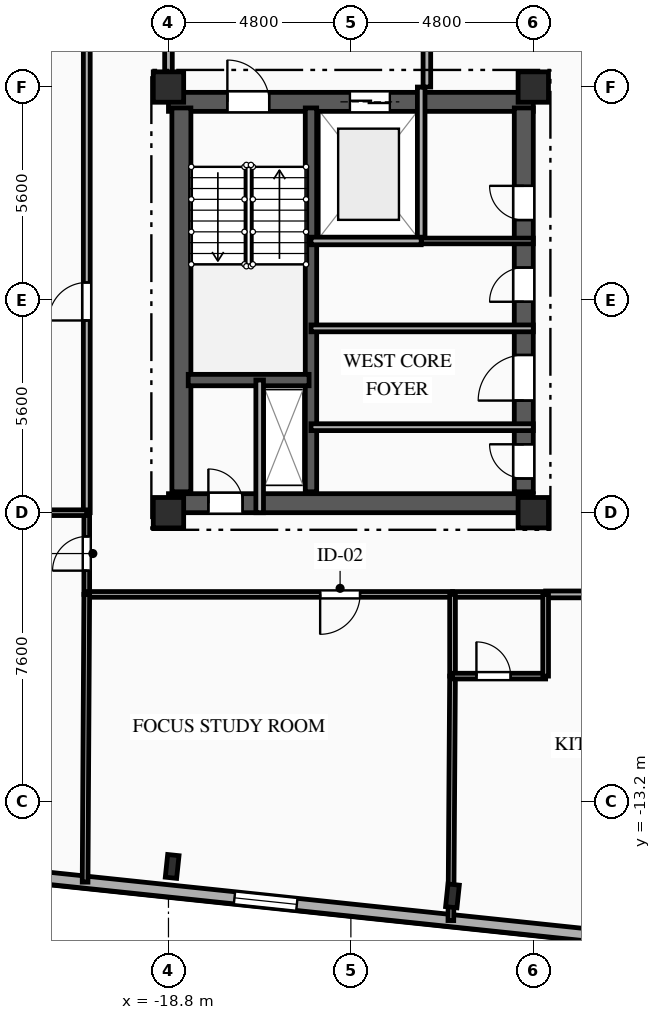
"""IFC4 building model, lengths in metres.
Left out: names, types, materials, properties, quantities, classifications, styles, units other than length and angle.
Written with IfcOpenShell. Run it as: python <this file> out.ifc"""

import sys

from ifc_helpers import new_model, si_unit, direction, frame, frame_2d, origin, origin_2d, place, context, subcontext, project, spatial, rectangle, i_section, extrude, element, fill, save


model = new_model("IFC4")
c1 = context("Model", 3, precision=1e-05, world=origin(), true_north=direction((0.0, 1.0)))
c2 = subcontext(c1, "Body", "Model", "MODEL_VIEW")
j1 = project(units=[si_unit("LENGTHUNIT", "METRE"), si_unit("PLANEANGLEUNIT", "RADIAN")], contexts=[c1])
p1 = place(None, origin())
s1 = spatial("IfcSite", under=j1, at=p1, CompositionType="ELEMENT")
p2 = place(p1, origin())
s2 = spatial("IfcBuilding", under=s1, at=p2, CompositionType="ELEMENT")
p3 = place(p2, frame((0.0, 0.0, 183.0)))
s3 = spatial("IfcBuildingStorey", under=s2, at=p3, CompositionType="ELEMENT", Elevation=183.0)
for number, where, z_axis, x_axis in (
    (1, (-18.8, -5.6, 0.0), (0.0, 0.0, 1.0), (1.0, 0.0, 0.0)),
    (2, (-18.8, 5.6, 0.0), (0.0, 0.0, 1.0), (1.0, 0.0, 0.0)),
    (3, (-9.2, -5.6, 0.0), (0.0, 0.0, 1.0), (1.0, 0.0, 0.0)),
    (4, (-9.2, 5.6, 0.0), (0.0, 0.0, 1.0), (1.0, 0.0, 0.0)),
):
    element("IfcColumn", number, at=place(p3, frame(where, z_axis=z_axis, x_axis=x_axis)), inside=s3, PredefinedType="COLUMN", context=c2, shape_type="SweptSolid", body=[
        extrude(rectangle(XDim=0.8, YDim=0.8, at=origin_2d()), origin(), (0.0, 0.0, 1.0), 3.35),
    ])
for number, where, z_axis, x_axis in (
    (5, (-18.703, -14.908, 0.0), (0.0, 0.0, 1.0), (0.995, -0.105, 0.0)),
    (6, (-11.327, -15.683, 0.0), (0.0, 0.0, 1.0), (0.995, -0.105, 0.0)),
):
    element("IfcColumn", number, at=place(p3, frame(where, z_axis=z_axis, x_axis=x_axis)), inside=s3, PredefinedType="COLUMN", context=c2, shape_type="SweptSolid", body=[
        extrude(i_section(OverallWidth=0.3, OverallDepth=0.6, WebThickness=0.015, FlangeThickness=0.03, FilletRadius=0.027, at=origin_2d()), origin(), (0.0, 0.0, 1.0), 3.35),
    ])
p4 = place(p3, frame((18.756, -19.498, 0.0), z_axis=(0.0, 0.0, 1.0), x_axis=(-0.994522060044, 0.104526896475, 0.0)))
e7 = element("IfcWall", 7, at=p4, inside=s3, PredefinedType="SOLIDWALL", context=c2, shape_type="SweptSolid", body=[
    extrude(rectangle(XDim=45.8, YDim=0.32, at=frame_2d((22.9, 0.0))), origin(), (0.0, 0.0, 1.0), 3.04),
])
p5 = place(p4, frame((1.217, 0.0, 0.85)))
e8 = element("IfcOpeningElement", 8, at=p5, cuts=e7, PredefinedType="OPENING", context=c2, shape_type="SweptSolid", body=[
    extrude(rectangle(XDim=1.65, YDim=1.85, at=frame_2d((0.825, 0.925))), frame((0.0, 0.17, 0.0), z_axis=(0.0, -1.0, 0.0), x_axis=(1.0, 0.0, 0.0)), (0.0, 0.0, 1.0), 0.34),
])
p6 = place(p4, frame((5.621, 0.0, 0.85)))
e9 = element("IfcOpeningElement", 9, at=p6, cuts=e7, PredefinedType="OPENING", context=c2, shape_type="SweptSolid", body=[
    extrude(rectangle(XDim=1.65, YDim=1.85, at=frame_2d((0.825, 0.925))), frame((0.0, 0.17, 0.0), z_axis=(0.0, -1.0, 0.0), x_axis=(1.0, 0.0, 0.0)), (0.0, 0.0, 1.0), 0.34),
])
p7 = place(p4, frame((13.433, 0.0, 0.85)))
e10 = element("IfcOpeningElement", 10, at=p7, cuts=e7, PredefinedType="OPENING", context=c2, shape_type="SweptSolid", body=[
    extrude(rectangle(XDim=2.2, YDim=1.85, at=frame_2d((1.1, 0.925))), frame((0.0, 0.17, 0.0), z_axis=(0.0, -1.0, 0.0), x_axis=(1.0, 0.0, 0.0)), (0.0, 0.0, 1.0), 0.34),
])
p8 = place(p4, frame((23.962, 0.0, 0.85)))
e11 = element("IfcOpeningElement", 11, at=p8, cuts=e7, PredefinedType="OPENING", context=c2, shape_type="SweptSolid", body=[
    extrude(rectangle(XDim=2.2, YDim=1.85, at=frame_2d((1.1, 0.925))), frame((0.0, 0.17, 0.0), z_axis=(0.0, -1.0, 0.0), x_axis=(1.0, 0.0, 0.0)), (0.0, 0.0, 1.0), 0.34),
])
p9 = place(p4, frame((34.366, 0.0, 0.85)))
e12 = element("IfcOpeningElement", 12, at=p9, cuts=e7, PredefinedType="OPENING", context=c2, shape_type="SweptSolid", body=[
    extrude(rectangle(XDim=1.65, YDim=1.85, at=frame_2d((0.825, 0.925))), frame((0.0, 0.17, 0.0), z_axis=(0.0, -1.0, 0.0), x_axis=(1.0, 0.0, 0.0)), (0.0, 0.0, 1.0), 0.34),
])
p10 = place(p4, frame((41.892, 0.0, 0.85)))
e13 = element("IfcOpeningElement", 13, at=p10, cuts=e7, PredefinedType="OPENING", context=c2, shape_type="SweptSolid", body=[
    extrude(rectangle(XDim=1.65, YDim=1.85, at=frame_2d((0.825, 0.925))), frame((0.0, 0.17, 0.0), z_axis=(0.0, -1.0, 0.0), x_axis=(1.0, 0.0, 0.0)), (0.0, 0.0, 1.0), 0.34),
])
p11 = place(p3, frame((-18.8, 5.21, 0.0), z_axis=(0.0, 0.0, 1.0), x_axis=(1.0, 0.0, 0.0)))
e14 = element("IfcWall", 14, at=p11, inside=s3, PredefinedType="SHEAR", context=c2, shape_type="SweptSolid", body=[
    extrude(rectangle(XDim=9.6, YDim=0.5, at=frame_2d((4.8, 0.0))), origin(), (0.0, 0.0, 1.0), 3.04),
])
p12 = place(p11, frame((1.55, 0.0, 0.0)))
e15 = element("IfcOpeningElement", 15, at=p12, cuts=e14, PredefinedType="OPENING", context=c2, shape_type="SweptSolid", body=[
    extrude(rectangle(XDim=1.1, YDim=2.15, at=frame_2d((0.55, 1.075))), frame((0.0, 0.26, 0.0), z_axis=(0.0, -1.0, 0.0), x_axis=(1.0, 0.0, 0.0)), (0.0, 0.0, 1.0), 0.52),
])
p13 = place(p11, frame((4.775, 0.0, 0.0)))
e16 = element("IfcOpeningElement", 16, at=p13, cuts=e14, PredefinedType="OPENING", context=c2, shape_type="SweptSolid", body=[
    extrude(rectangle(XDim=1.05, YDim=2.1, at=frame_2d((0.525, 1.05))), frame((0.0, 0.26, 0.0), z_axis=(0.0, -1.0, 0.0), x_axis=(1.0, 0.0, 0.0)), (0.0, 0.0, 1.0), 0.52),
])
p14 = place(p3, frame((-18.8, -5.35, 0.0), z_axis=(0.0, 0.0, 1.0), x_axis=(1.0, 0.0, 0.0)))
e17 = element("IfcWall", 17, at=p14, inside=s3, PredefinedType="SHEAR", context=c2, shape_type="SweptSolid", body=[
    extrude(rectangle(XDim=9.6, YDim=0.5, at=frame_2d((4.8, 0.0))), origin(), (0.0, 0.0, 1.0), 3.04),
])
p15 = place(p14, frame((1.05, 0.0, 0.0)))
e18 = element("IfcOpeningElement", 18, at=p15, cuts=e17, PredefinedType="OPENING", context=c2, shape_type="SweptSolid", body=[
    extrude(rectangle(XDim=0.9, YDim=2.1, at=frame_2d((0.45, 1.05))), frame((0.0, 0.26, 0.0), z_axis=(0.0, -1.0, 0.0), x_axis=(1.0, 0.0, 0.0)), (0.0, 0.0, 1.0), 0.52),
])
p16 = place(p3, frame((-18.46, -5.05, 0.0), z_axis=(0.0, 0.0, 1.0), x_axis=(0.0, 1.0, 0.0)))
e19 = element("IfcWall", 19, at=p16, inside=s3, PredefinedType="SHEAR", context=c2, shape_type="SweptSolid", body=[
    extrude(rectangle(XDim=10.1, YDim=0.5, at=frame_2d((5.05, 0.0))), origin(), (0.0, 0.0, 1.0), 3.04),
])
p17 = place(p3, frame((-9.45, -5.05, 0.0), z_axis=(0.0, 0.0, 1.0), x_axis=(0.0, 1.0, 0.0)))
e20 = element("IfcWall", 20, at=p17, inside=s3, PredefinedType="SHEAR", context=c2, shape_type="SweptSolid", body=[
    extrude(rectangle(XDim=10.1, YDim=0.5, at=frame_2d((5.05, 0.0))), origin(), (0.0, 0.0, 1.0), 3.04),
])
p18 = place(p17, frame((7.15, 0.0, 0.0)))
e21 = element("IfcOpeningElement", 21, at=p18, cuts=e20, PredefinedType="OPENING", context=c2, shape_type="SweptSolid", body=[
    extrude(rectangle(XDim=0.9, YDim=2.1, at=frame_2d((0.45, 1.05))), frame((0.0, 0.26, 0.0), z_axis=(0.0, -1.0, 0.0), x_axis=(1.0, 0.0, 0.0)), (0.0, 0.0, 1.0), 0.52),
])
p19 = place(p17, frame((2.4, 0.0, 0.0)))
e22 = element("IfcOpeningElement", 22, at=p19, cuts=e20, PredefinedType="OPENING", context=c2, shape_type="SweptSolid", body=[
    extrude(rectangle(XDim=1.2, YDim=2.15, at=frame_2d((0.6, 1.075))), frame((0.0, 0.26, 0.0), z_axis=(0.0, -1.0, 0.0), x_axis=(1.0, 0.0, 0.0)), (0.0, 0.0, 1.0), 0.52),
])
p20 = place(p17, frame((0.35, 0.0, 0.0)))
e23 = element("IfcOpeningElement", 23, at=p20, cuts=e20, PredefinedType="OPENING", context=c2, shape_type="SweptSolid", body=[
    extrude(rectangle(XDim=0.9, YDim=2.1, at=frame_2d((0.45, 1.05))), frame((0.0, 0.26, 0.0), z_axis=(0.0, -1.0, 0.0), x_axis=(1.0, 0.0, 0.0)), (0.0, 0.0, 1.0), 0.52),
])
p21 = place(p17, frame((5.0, 0.0, 0.0)))
e24 = element("IfcOpeningElement", 24, at=p21, cuts=e20, PredefinedType="OPENING", context=c2, shape_type="SweptSolid", body=[
    extrude(rectangle(XDim=0.9, YDim=2.1, at=frame_2d((0.45, 1.05))), frame((0.0, 0.26, 0.0), z_axis=(0.0, -1.0, 0.0), x_axis=(1.0, 0.0, 0.0)), (0.0, 0.0, 1.0), 0.52),
])
p22 = place(p3, frame((-15.05, -5.05, 0.0), z_axis=(0.0, 0.0, 1.0), x_axis=(0.0, 1.0, 0.0)))
e25 = element("IfcWall", 25, at=p22, inside=s3, PredefinedType="SHEAR", context=c2, shape_type="SweptSolid", body=[
    extrude(rectangle(XDim=10.1, YDim=0.3, at=frame_2d((5.05, 0.0))), origin(), (0.0, 0.0, 1.0), 3.04),
])
p23 = place(p3, frame((-18.28, -2.11, 0.0), z_axis=(0.0, 0.0, 1.0), x_axis=(1.0, 0.0, 0.0)))
e26 = element("IfcWall", 26, at=p23, inside=s3, PredefinedType="SHEAR", context=c2, shape_type="SweptSolid", body=[
    extrude(rectangle(XDim=3.18, YDim=0.3, at=frame_2d((1.59, 0.0))), origin(), (0.0, 0.0, 1.0), 3.04),
])
p24 = place(p3, frame((-16.4, -5.6, 0.0), z_axis=(0.0, 0.0, 1.0), x_axis=(0.0, 1.0, 0.0)))
e27 = element("IfcWall", 27, at=p24, inside=s3, PredefinedType="PARTITIONING", context=c2, shape_type="SweptSolid", body=[
    extrude(rectangle(XDim=3.49, YDim=0.2, at=frame_2d((1.745, 0.0))), origin(), (0.0, 0.0, 1.0), 3.04),
])
p25 = place(p3, frame((-12.15, 1.55, 0.0), z_axis=(0.0, 0.0, 1.0), x_axis=(0.0, 1.0, 0.0)))
e28 = element("IfcWall", 28, at=p25, inside=s3, PredefinedType="PARTITIONING", context=c2, shape_type="SweptSolid", body=[
    extrude(rectangle(XDim=4.05, YDim=0.2, at=frame_2d((2.025, 0.0))), origin(), (0.0, 0.0, 1.0), 3.04),
])
p26 = place(p3, frame((-18.8, 8.5, 0.0), z_axis=(0.0, 0.0, 1.0), x_axis=(0.0, -1.0, 0.0)))
e29 = element("IfcWall", 29, at=p26, inside=s3, PredefinedType="PARTITIONING", context=c2, shape_type="SweptSolid", body=[
    extrude(rectangle(XDim=2.9, YDim=0.2, at=frame_2d((1.45, 0.0))), origin(), (0.0, 0.0, 1.0), 2.665),
])
p27 = place(p3, frame((-12.0, 5.6, 0.0), z_axis=(0.0, 0.0, 1.0), x_axis=(0.0, 1.0, 0.0)))
e30 = element("IfcWall", 30, at=p27, inside=s3, PredefinedType="PARTITIONING", context=c2, shape_type="SweptSolid", body=[
    extrude(rectangle(XDim=2.9, YDim=0.2, at=frame_2d((1.45, 0.0))), origin(), (0.0, 0.0, 1.0), 3.04),
])
p28 = place(p3, frame((-12.15, 1.55, 0.0), z_axis=(0.0, 0.0, 1.0), x_axis=(1.0, 0.0, 0.0)))
e31 = element("IfcWall", 31, at=p28, inside=s3, PredefinedType="PARTITIONING", context=c2, shape_type="SweptSolid", body=[
    extrude(rectangle(XDim=2.95, YDim=0.15, at=frame_2d((1.475, 0.0))), origin(), (0.0, 0.0, 1.0), 3.04),
])
p29 = place(p3, frame((-15.05, -3.35, 0.0), z_axis=(0.0, 0.0, 1.0), x_axis=(1.0, 0.0, 0.0)))
e32 = element("IfcWall", 32, at=p29, inside=s3, PredefinedType="PARTITIONING", context=c2, shape_type="SweptSolid", body=[
    extrude(rectangle(XDim=5.85, YDim=0.18, at=frame_2d((2.925, 0.0))), origin(), (0.0, 0.0, 1.0), 2.755),
])
p30 = place(p3, frame((-9.2, -0.75, 0.0), z_axis=(0.0, 0.0, 1.0), x_axis=(-1.0, 0.0, 0.0)))
e33 = element("IfcWall", 33, at=p30, inside=s3, PredefinedType="PARTITIONING", context=c2, shape_type="SweptSolid", body=[
    extrude(rectangle(XDim=5.85, YDim=0.18, at=frame_2d((2.925, 0.0))), origin(), (0.0, 0.0, 1.0), 3.04),
])
p31 = place(p3, frame((-20.95, -7.75, 0.0), z_axis=(0.0, 0.0, 1.0), x_axis=(0.0, 1.0, 0.0)))
e34 = element("IfcWall", 34, at=p31, inside=s3, PredefinedType="PARTITIONING", context=c2, shape_type="SweptSolid", body=[
    extrude(rectangle(XDim=2.15, YDim=0.15, at=frame_2d((1.075, 0.0))), origin(), (0.0, 0.0, 1.0), 3.04),
])
p32 = place(p31, frame((0.625, 0.0, 0.0)))
e35 = element("IfcOpeningElement", 35, at=p32, cuts=e34, PredefinedType="OPENING", context=c2, shape_type="SweptSolid", body=[
    extrude(rectangle(XDim=0.9, YDim=2.1, at=frame_2d((0.45, 1.05))), frame((0.0, 0.085, 0.0), z_axis=(0.0, -1.0, 0.0), x_axis=(1.0, 0.0, 0.0)), (0.0, 0.0, 1.0), 0.17),
])
p33 = place(p3, frame((-11.325, -7.75, 0.0), z_axis=(0.0, 0.0, 1.0), x_axis=(-1.0, 0.0, 0.0)))
e36 = element("IfcWall", 36, at=p33, inside=s3, PredefinedType="PARTITIONING", context=c2, shape_type="SweptSolid", body=[
    extrude(rectangle(XDim=9.625, YDim=0.15, at=frame_2d((4.812, 0.0))), origin(), (0.0, 0.0, 1.0), 3.04),
])
p34 = place(p33, frame((2.434, 0.0, 0.0)))
e37 = element("IfcOpeningElement", 37, at=p34, cuts=e36, PredefinedType="OPENING", context=c2, shape_type="SweptSolid", body=[
    extrude(rectangle(XDim=1.05, YDim=2.15, at=frame_2d((0.525, 1.075))), frame((0.0, 0.085, 0.0), z_axis=(0.0, -1.0, 0.0), x_axis=(1.0, 0.0, 0.0)), (0.0, 0.0, 1.0), 0.17),
])
p35 = place(p3, frame((-0.85, -7.75, 0.0), z_axis=(0.0, 0.0, 1.0), x_axis=(-1.0, 0.0, 0.0)))
e38 = element("IfcWall", 38, at=p35, inside=s3, PredefinedType="PARTITIONING", context=c2, shape_type="SweptSolid", body=[
    extrude(rectangle(XDim=8.025, YDim=0.18, at=frame_2d((4.012, 0.0))), origin(), (0.0, 0.0, 1.0), 3.04),
])
p36 = place(p35, frame((1.313, 0.0, 0.0)))
e39 = element("IfcOpeningElement", 39, at=p36, cuts=e38, PredefinedType="OPENING", context=c2, shape_type="SweptSolid", body=[
    extrude(rectangle(XDim=1.0, YDim=2.15, at=frame_2d((0.5, 1.075))), frame((0.0, 0.1, 0.0), z_axis=(0.0, -1.0, 0.0), x_axis=(1.0, 0.0, 0.0)), (0.0, 0.0, 1.0), 0.2),
])
p37 = place(p3, frame((-8.875, -7.75, 0.0), z_axis=(0.0, 0.0, 1.0), x_axis=(-1.0, 0.0, 0.0)))
e40 = element("IfcWall", 40, at=p37, inside=s3, PredefinedType="PLUMBINGWALL", context=c2, shape_type="SweptSolid", body=[
    extrude(rectangle(XDim=2.45, YDim=0.15, at=frame_2d((1.225, 0.0))), origin(), (0.0, 0.0, 1.0), 3.04),
])
p38 = place(p3, frame((-20.95, -5.6, 0.0), z_axis=(0.0, 0.0, 1.0), x_axis=(0.0, 1.0, 0.0)))
e41 = element("IfcWall", 41, at=p38, inside=s3, PredefinedType="PARTITIONING", context=c2, shape_type="SweptSolid", body=[
    extrude(rectangle(XDim=14.1, YDim=0.18, at=frame_2d((7.05, 0.0))), origin(), (0.0, 0.0, 1.0), 3.04),
])
p39 = place(p38, frame((5.058, 0.0, 0.0)))
e42 = element("IfcOpeningElement", 42, at=p39, cuts=e41, PredefinedType="OPENING", context=c2, shape_type="SweptSolid", body=[
    extrude(rectangle(XDim=1.0, YDim=2.15, at=frame_2d((0.5, 1.075))), frame((0.0, 0.1, 0.0), z_axis=(0.0, -1.0, 0.0), x_axis=(1.0, 0.0, 0.0)), (0.0, 0.0, 1.0), 0.2),
])
p40 = place(p3, frame((-20.95, -5.6, 0.0), z_axis=(0.0, 0.0, 1.0), x_axis=(-1.0, 0.0, 0.0)))
e43 = element("IfcWall", 43, at=p40, inside=s3, PredefinedType="PARTITIONING", context=c2, shape_type="SweptSolid", body=[
    extrude(rectangle(XDim=2.65, YDim=0.15, at=frame_2d((1.325, 0.0))), origin(), (0.0, 0.0, 1.0), 3.04),
])
p41 = place(p40, frame((0.965, 0.0, 0.0)))
e44 = element("IfcOpeningElement", 44, at=p41, cuts=e43, PredefinedType="OPENING", context=c2, shape_type="SweptSolid", body=[
    extrude(rectangle(XDim=1.05, YDim=2.15, at=frame_2d((0.525, 1.075))), frame((0.0, 0.085, 0.0), z_axis=(0.0, -1.0, 0.0), x_axis=(1.0, 0.0, 0.0)), (0.0, 0.0, 1.0), 0.17),
])
p42 = place(p3, frame((-20.95, -7.75, 0.0), z_axis=(0.0, 0.0, 1.0), x_axis=(-0.005804668564, -0.99998315277, 0.0)))
e45 = element("IfcWall", 45, at=p42, inside=s3, PredefinedType="PARTITIONING", context=c2, shape_type="SweptSolid", body=[
    extrude(rectangle(XDim=7.571, YDim=0.15, at=frame_2d((3.785, 0.0))), origin(), (0.0, 0.0, 1.0), 3.04),
])
p43 = place(p3, frame((-11.325, -9.9, 0.0), z_axis=(0.0, 0.0, 1.0), x_axis=(-0.006831737937, -0.999976663406, 0.0)))
e46 = element("IfcWall", 46, at=p43, inside=s3, PredefinedType="PARTITIONING", context=c2, shape_type="SweptSolid", body=[
    extrude(rectangle(XDim=6.433, YDim=0.15, at=frame_2d((3.216, 0.0))), origin(), (0.0, 0.0, 1.0), 2.665),
])
p44 = place(p3, frame((-11.325, -7.75, 0.0), z_axis=(0.0, 0.0, 1.0), x_axis=(0.0, -1.0, 0.0)))
e47 = element("IfcWall", 47, at=p44, inside=s3, PredefinedType="PLUMBINGWALL", context=c2, shape_type="SweptSolid", body=[
    extrude(rectangle(XDim=2.15, YDim=0.15, at=frame_2d((1.075, 0.0))), origin(), (0.0, 0.0, 1.0), 3.04),
])
p45 = place(p3, frame((-11.325, -9.9, 0.0), z_axis=(0.0, 0.0, 1.0), x_axis=(1.0, 0.0, 0.0)))
e48 = element("IfcWall", 48, at=p45, inside=s3, PredefinedType="PLUMBINGWALL", context=c2, shape_type="SweptSolid", body=[
    extrude(rectangle(XDim=2.45, YDim=0.15, at=frame_2d((1.225, 0.0))), origin(), (0.0, 0.0, 1.0), 3.04),
])
p46 = place(p45, frame((0.629, 0.0, 0.0)))
e49 = element("IfcOpeningElement", 49, at=p46, cuts=e48, PredefinedType="OPENING", context=c2, shape_type="SweptSolid", body=[
    extrude(rectangle(XDim=0.9, YDim=2.1, at=frame_2d((0.45, 1.05))), frame((0.0, 0.085, 0.0), z_axis=(0.0, -1.0, 0.0), x_axis=(1.0, 0.0, 0.0)), (0.0, 0.0, 1.0), 0.17),
])
p47 = place(p3, frame((-8.875, -9.9, 0.0), z_axis=(0.0, 0.0, 1.0), x_axis=(0.0, 1.0, 0.0)))
e50 = element("IfcWall", 50, at=p47, inside=s3, PredefinedType="PLUMBINGWALL", context=c2, shape_type="SweptSolid", body=[
    extrude(rectangle(XDim=2.15, YDim=0.15, at=frame_2d((1.075, 0.0))), origin(), (0.0, 0.0, 1.0), 3.04),
])
p48 = place(p3, frame((-15.05, 1.55, 0.0), z_axis=(0.0, 0.0, 1.0), x_axis=(1.0, 0.0, 0.0)))
e51 = element("IfcWall", 51, at=p48, inside=s3, PredefinedType="PARTITIONING", context=c2, shape_type="SweptSolid", body=[
    extrude(rectangle(XDim=2.9, YDim=0.2, at=frame_2d((1.45, 0.0))), origin(), (0.0, 0.0, 1.0), 3.04),
])
p49 = place(p9, origin())
e52 = element("IfcWindow", 52, at=p49, inside=s3, PartitioningType="SINGLE_PANEL", PredefinedType="WINDOW", context=c2, shape_type="SweptSolid", body=[
    extrude(rectangle(XDim=1.65, YDim=1.85, at=frame_2d((0.825, 0.925))), frame((0.0, 0.03, 0.0), z_axis=(0.0, -1.0, 0.0), x_axis=(1.0, 0.0, 0.0)), (0.0, 0.0, 1.0), 0.06),
])
fill(e12, e52)
p50 = place(p12, origin())
e53 = element("IfcDoor", 53, at=p50, inside=s3, OperationType="SINGLE_SWING_LEFT", PredefinedType="DOOR", context=c2, shape_type="SweptSolid", body=[
    extrude(rectangle(XDim=1.1, YDim=2.15, at=frame_2d((0.55, 1.075))), frame((0.0, 0.025, 0.0), z_axis=(0.0, -1.0, 0.0), x_axis=(1.0, 0.0, 0.0)), (0.0, 0.0, 1.0), 0.05),
])
fill(e15, e53)
p51 = place(p13, origin())
e54 = element("IfcDoor", 54, at=p51, inside=s3, OperationType="DOUBLE_DOOR_SLIDING", PredefinedType="DOOR", context=c2, shape_type="SweptSolid", body=[
    extrude(rectangle(XDim=1.05, YDim=2.1, at=frame_2d((0.525, 1.05))), frame((0.0, 0.025, 0.0), z_axis=(0.0, -1.0, 0.0), x_axis=(1.0, 0.0, 0.0)), (0.0, 0.0, 1.0), 0.05),
])
fill(e16, e54)
p52 = place(p15, origin())
e55 = element("IfcDoor", 55, at=p52, inside=s3, OperationType="SINGLE_SWING_LEFT", PredefinedType="DOOR", context=c2, shape_type="SweptSolid", body=[
    extrude(rectangle(XDim=0.9, YDim=2.1, at=frame_2d((0.45, 1.05))), frame((0.0, 0.025, 0.0), z_axis=(0.0, -1.0, 0.0), x_axis=(1.0, 0.0, 0.0)), (0.0, 0.0, 1.0), 0.05),
])
fill(e18, e55)
p53 = place(p18, origin())
e56 = element("IfcDoor", 56, at=p53, inside=s3, OperationType="SINGLE_SWING_RIGHT", PredefinedType="DOOR", context=c2, shape_type="SweptSolid", body=[
    extrude(rectangle(XDim=0.9, YDim=2.1, at=frame_2d((0.45, 1.05))), frame((0.0, 0.025, 0.0), z_axis=(0.0, -1.0, 0.0), x_axis=(1.0, 0.0, 0.0)), (0.0, 0.0, 1.0), 0.05),
])
fill(e21, e56)
p54 = place(p19, origin())
e57 = element("IfcDoor", 57, at=p54, inside=s3, OperationType="SINGLE_SWING_LEFT", PredefinedType="DOOR", context=c2, shape_type="SweptSolid", body=[
    extrude(rectangle(XDim=1.2, YDim=2.15, at=frame_2d((0.6, 1.075))), frame((0.0, 0.025, 0.0), z_axis=(0.0, -1.0, 0.0), x_axis=(1.0, 0.0, 0.0)), (0.0, 0.0, 1.0), 0.05),
])
fill(e22, e57)
p55 = place(p20, origin())
e58 = element("IfcDoor", 58, at=p55, inside=s3, OperationType="SINGLE_SWING_RIGHT", PredefinedType="DOOR", context=c2, shape_type="SweptSolid", body=[
    extrude(rectangle(XDim=0.9, YDim=2.1, at=frame_2d((0.45, 1.05))), frame((0.0, 0.025, 0.0), z_axis=(0.0, -1.0, 0.0), x_axis=(1.0, 0.0, 0.0)), (0.0, 0.0, 1.0), 0.05),
])
fill(e23, e58)
p56 = place(p21, origin())
e59 = element("IfcDoor", 59, at=p56, inside=s3, OperationType="SINGLE_SWING_LEFT", PredefinedType="DOOR", context=c2, shape_type="SweptSolid", body=[
    extrude(rectangle(XDim=0.9, YDim=2.1, at=frame_2d((0.45, 1.05))), frame((0.0, 0.025, 0.0), z_axis=(0.0, -1.0, 0.0), x_axis=(1.0, 0.0, 0.0)), (0.0, 0.0, 1.0), 0.05),
])
fill(e24, e59)
p57 = place(p32, origin())
e60 = element("IfcDoor", 60, at=p57, inside=s3, OperationType="SINGLE_SWING_LEFT", PredefinedType="DOOR", context=c2, shape_type="SweptSolid", body=[
    extrude(rectangle(XDim=0.9, YDim=2.1, at=frame_2d((0.45, 1.05))), frame((0.0, 0.025, 0.0), z_axis=(0.0, -1.0, 0.0), x_axis=(1.0, 0.0, 0.0)), (0.0, 0.0, 1.0), 0.05),
])
fill(e35, e60)
p58 = place(p34, origin())
e61 = element("IfcDoor", 61, at=p58, inside=s3, OperationType="SINGLE_SWING_RIGHT", PredefinedType="DOOR", context=c2, shape_type="SweptSolid", body=[
    extrude(rectangle(XDim=1.05, YDim=2.15, at=frame_2d((0.525, 1.075))), frame((0.0, 0.025, 0.0), z_axis=(0.0, -1.0, 0.0), x_axis=(1.0, 0.0, 0.0)), (0.0, 0.0, 1.0), 0.05),
])
fill(e37, e61)
p59 = place(p39, origin())
e62 = element("IfcDoor", 62, at=p59, inside=s3, OperationType="SINGLE_SWING_LEFT", PredefinedType="DOOR", context=c2, shape_type="SweptSolid", body=[
    extrude(rectangle(XDim=1.0, YDim=2.15, at=frame_2d((0.5, 1.075))), frame((0.0, 0.025, 0.0), z_axis=(0.0, -1.0, 0.0), x_axis=(1.0, 0.0, 0.0)), (0.0, 0.0, 1.0), 0.05),
])
fill(e42, e62)
p60 = place(p46, origin())
e63 = element("IfcDoor", 63, at=p60, inside=s3, OperationType="SINGLE_SWING_LEFT", PredefinedType="DOOR", context=c2, shape_type="SweptSolid", body=[
    extrude(rectangle(XDim=0.9, YDim=2.1, at=frame_2d((0.45, 1.05))), frame((0.0, 0.025, 0.0), z_axis=(0.0, -1.0, 0.0), x_axis=(1.0, 0.0, 0.0)), (0.0, 0.0, 1.0), 0.05),
])
fill(e49, e63)
save(model, sys.argv[1])
